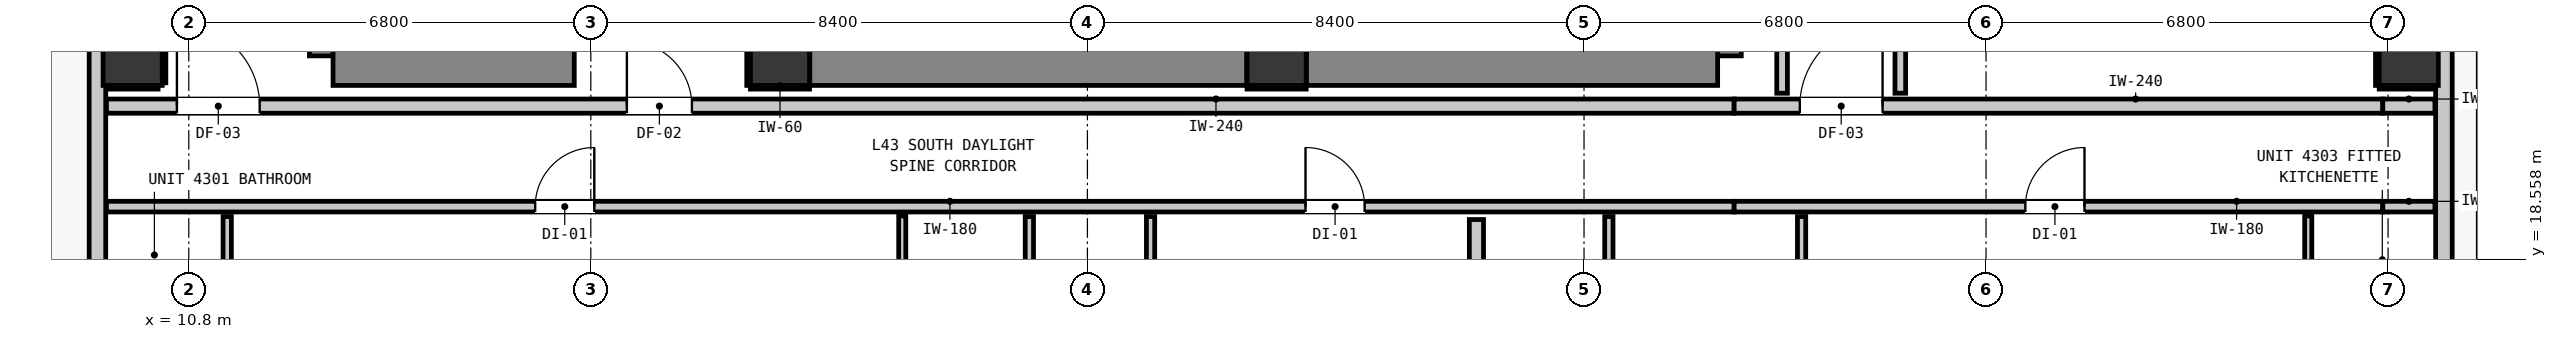
"""IFC4 building model, lengths in metres.
Left out: names, types, materials, properties, quantities, classifications, styles, units other than length and angle.
Written with IfcOpenShell. Run it as: python <this file> out.ifc"""

import sys

from ifc_helpers import new_model, si_unit, direction, frame, frame_2d, origin, origin_2d, place, context, subcontext, project, spatial, rectangle, extrude, element, fill, save


model = new_model("IFC4")
c1 = context("Model", 3, precision=1e-05, world=origin(), true_north=direction((0.0, 1.0)))
c2 = subcontext(c1, "Body", "Model", "MODEL_VIEW")
j1 = project(units=[si_unit("LENGTHUNIT", "METRE"), si_unit("PLANEANGLEUNIT", "RADIAN")], contexts=[c1])
p1 = place(None, origin())
s1 = spatial("IfcSite", under=j1, at=p1, CompositionType="ELEMENT")
p2 = place(p1, origin())
s2 = spatial("IfcBuilding", under=s1, at=p2, CompositionType="ELEMENT")
p3 = place(p2, frame((0.0, 0.0, 149.24)))
s3 = spatial("IfcBuildingStorey", under=s2, at=p3, CompositionType="ELEMENT", Elevation=149.24)
for number, where, z_axis, x_axis in (
    (1, (20.8, 22.0, 0.0), (0.0, 0.0, 1.0), (1.0, 0.0, 0.0)),
    (2, (29.2, 22.0, 0.0), (0.0, 0.0, 1.0), (1.0, 0.0, 0.0)),
):
    element("IfcColumn", number, at=place(p3, frame(where, z_axis=z_axis, x_axis=x_axis)), inside=s3, PredefinedType="COLUMN", context=c2, shape_type="SweptSolid", body=[
        extrude(rectangle(XDim=1.0, YDim=1.0, at=origin_2d()), origin(), (0.0, 0.0, 1.0), 3.32),
    ])
p4 = place(p3, frame((13.34, 22.0, 0.0), z_axis=(0.0, 0.0, 1.0), x_axis=(0.0, 1.0, 0.0)))
e3 = element("IfcWall", 3, at=p4, inside=s3, PredefinedType="SHEAR", context=c2, shape_type="SweptSolid", body=[
    extrude(rectangle(XDim=8.195, YDim=1.0, at=frame_2d((4.098, 0.0))), origin(), (0.0, 0.0, 1.0), 3.32),
])
p5 = place(p3, frame((13.24, 22.0, 0.0), z_axis=(0.0, 0.0, 1.0), x_axis=(1.0, 0.0, 0.0)))
e4 = element("IfcWall", 4, at=p5, inside=s3, PredefinedType="SHEAR", context=c2, shape_type="SweptSolid", body=[
    extrude(rectangle(XDim=4.08, YDim=1.0, at=frame_2d((2.04, 0.0))), origin(), (0.0, 0.0, 1.0), 3.32),
])
p6 = place(p3, frame((36.56, 22.0, 0.0), z_axis=(0.0, 0.0, 1.0), x_axis=(0.0, 1.0, 0.0)))
e5 = element("IfcWall", 5, at=p6, inside=s3, PredefinedType="SHEAR", context=c2, shape_type="SweptSolid", body=[
    extrude(rectangle(XDim=8.195, YDim=1.0, at=frame_2d((4.098, 0.0))), origin(), (0.0, 0.0, 1.0), 3.32),
])
p7 = place(p3, frame((29.705, 22.0, 0.0), z_axis=(0.0, 0.0, 1.0), x_axis=(1.0, 0.0, 0.0)))
e6 = element("IfcWall", 6, at=p7, inside=s3, PredefinedType="SHEAR", context=c2, shape_type="SweptSolid", body=[
    extrude(rectangle(XDim=6.955, YDim=1.0, at=frame_2d((3.478, 0.0))), origin(), (0.0, 0.0, 1.0), 3.32),
])
p8 = place(p3, frame((21.305, 22.0, 0.0), z_axis=(0.0, 0.0, 1.0), x_axis=(1.0, 0.0, 0.0)))
e7 = element("IfcWall", 7, at=p8, inside=s3, PredefinedType="SHEAR", context=c2, shape_type="SweptSolid", body=[
    extrude(rectangle(XDim=7.39, YDim=1.0, at=frame_2d((3.695, 0.0))), origin(), (0.0, 0.0, 1.0), 3.32),
])
for number, where, z_axis, x_axis in (
    (8, (9.85, 22.0, 0.0), (0.0, 0.0, 1.0), (1.0, 0.0, 0.0)),
    (9, (48.35, 22.0, 0.0), (0.0, 0.0, 1.0), (1.0, 0.0, 0.0)),
):
    element("IfcColumn", number, at=place(p3, frame(where, z_axis=z_axis, x_axis=x_axis)), inside=s3, PredefinedType="COLUMN", context=c2, shape_type="SweptSolid", body=[
        extrude(rectangle(XDim=1.0, YDim=1.0, at=origin_2d()), origin(), (0.0, 0.0, 1.0), 3.32),
    ])
p9 = place(p3, frame((9.255, 17.555, 0.0), z_axis=(0.0, 0.0, 1.0), x_axis=(0.0, 1.0, 0.0)))
e10 = element("IfcWall", 10, at=p9, inside=s3, PredefinedType="STANDARD", context=c2, shape_type="SweptSolid", body=[
    extrude(rectangle(XDim=32.29, YDim=0.28, at=frame_2d((16.145, 0.0))), origin(), (0.0, 0.0, 1.0), 3.08),
])
p10 = place(p9, frame((5.467, 0.0, 0.0)))
e11 = element("IfcOpeningElement", 11, at=p10, cuts=e10, PredefinedType="OPENING", context=c2, shape_type="SweptSolid", body=[
    extrude(rectangle(XDim=1.0, YDim=2.15, at=frame_2d((0.5, 1.075))), frame((0.0, 0.15, 0.0), z_axis=(0.0, -1.0, 0.0), x_axis=(1.0, 0.0, 0.0)), (0.0, 0.0, 1.0), 0.3),
])
p11 = place(p9, frame((30.753, 0.0, 0.85)))
e12 = element("IfcOpeningElement", 12, at=p11, cuts=e10, PredefinedType="OPENING", context=c2, shape_type="SweptSolid", body=[
    extrude(rectangle(XDim=1.05, YDim=1.65, at=frame_2d((0.525, 0.825))), frame((0.0, 0.15, 0.0), z_axis=(0.0, -1.0, 0.0), x_axis=(1.0, 0.0, 0.0)), (0.0, 0.0, 1.0), 0.3),
])
p12 = place(p3, frame((48.945, 49.845, 0.0), z_axis=(0.0, 0.0, 1.0), x_axis=(0.0, -1.0, 0.0)))
e13 = element("IfcWall", 13, at=p12, inside=s3, PredefinedType="STANDARD", context=c2, shape_type="SweptSolid", body=[
    extrude(rectangle(XDim=32.29, YDim=0.28, at=frame_2d((16.145, 0.0))), origin(), (0.0, 0.0, 1.0), 3.08),
])
p13 = place(p12, frame((0.904, 0.0, 0.0)))
e14 = element("IfcOpeningElement", 14, at=p13, cuts=e13, PredefinedType="OPENING", context=c2, shape_type="SweptSolid", body=[
    extrude(rectangle(XDim=1.0, YDim=2.15, at=frame_2d((0.5, 1.075))), frame((0.0, 0.15, 0.0), z_axis=(0.0, -1.0, 0.0), x_axis=(1.0, 0.0, 0.0)), (0.0, 0.0, 1.0), 0.3),
])
p14 = place(p12, frame((3.074, 0.0, 0.85)))
e15 = element("IfcOpeningElement", 15, at=p14, cuts=e13, PredefinedType="OPENING", context=c2, shape_type="SweptSolid", body=[
    extrude(rectangle(XDim=1.05, YDim=1.65, at=frame_2d((0.525, 0.825))), frame((0.0, 0.15, 0.0), z_axis=(0.0, -1.0, 0.0), x_axis=(1.0, 0.0, 0.0)), (0.0, 0.0, 1.0), 0.3),
])
p15 = place(p12, frame((23.057, 0.0, 0.85)))
e16 = element("IfcOpeningElement", 16, at=p15, cuts=e13, PredefinedType="OPENING", context=c2, shape_type="SweptSolid", body=[
    extrude(rectangle(XDim=2.7, YDim=2.0, at=frame_2d((1.35, 1.0))), frame((0.0, 0.15, 0.0), z_axis=(0.0, -1.0, 0.0), x_axis=(1.0, 0.0, 0.0)), (0.0, 0.0, 1.0), 0.3),
])
p16 = place(p12, frame((20.733, 0.0, 0.85)))
e17 = element("IfcOpeningElement", 17, at=p16, cuts=e13, PredefinedType="OPENING", context=c2, shape_type="SweptSolid", body=[
    extrude(rectangle(XDim=1.05, YDim=1.65, at=frame_2d((0.525, 0.825))), frame((0.0, 0.15, 0.0), z_axis=(0.0, -1.0, 0.0), x_axis=(1.0, 0.0, 0.0)), (0.0, 0.0, 1.0), 0.3),
])
p17 = place(p12, frame((13.523, 0.0, 0.85)))
e18 = element("IfcOpeningElement", 18, at=p17, cuts=e13, PredefinedType="OPENING", context=c2, shape_type="SweptSolid", body=[
    extrude(rectangle(XDim=2.7, YDim=2.0, at=frame_2d((1.35, 1.0))), frame((0.0, 0.15, 0.0), z_axis=(0.0, -1.0, 0.0), x_axis=(1.0, 0.0, 0.0)), (0.0, 0.0, 1.0), 0.3),
])
p18 = place(p12, frame((11.247, 0.0, 0.85)))
e19 = element("IfcOpeningElement", 19, at=p18, cuts=e13, PredefinedType="OPENING", context=c2, shape_type="SweptSolid", body=[
    extrude(rectangle(XDim=1.05, YDim=1.65, at=frame_2d((0.525, 0.825))), frame((0.0, 0.15, 0.0), z_axis=(0.0, -1.0, 0.0), x_axis=(1.0, 0.0, 0.0)), (0.0, 0.0, 1.0), 0.3),
])
p19 = place(p3, frame((9.407, 21.15, 0.0), z_axis=(0.0, 0.0, 1.0), x_axis=(1.0, 0.0, 0.0)))
e20 = element("IfcWall", 20, at=p19, inside=s3, PredefinedType="PARTITIONING", context=c2, shape_type="SweptSolid", body=[
    extrude(rectangle(XDim=27.532, YDim=0.24, at=frame_2d((13.766, 0.0))), origin(), (0.0, 0.0, 1.0), 3.08),
])
p20 = place(p19, frame((8.803, 0.0, 0.0)))
e21 = element("IfcOpeningElement", 21, at=p20, cuts=e20, PredefinedType="OPENING", context=c2, shape_type="SweptSolid", body=[
    extrude(rectangle(XDim=1.1, YDim=2.15, at=frame_2d((0.55, 1.075))), frame((0.0, 0.13, 0.0), z_axis=(0.0, -1.0, 0.0), x_axis=(1.0, 0.0, 0.0)), (0.0, 0.0, 1.0), 0.26),
])
p21 = place(p19, frame((1.192, 0.0, 0.0)))
e22 = element("IfcOpeningElement", 22, at=p21, cuts=e20, PredefinedType="OPENING", context=c2, shape_type="SweptSolid", body=[
    extrude(rectangle(XDim=1.4, YDim=2.15, at=frame_2d((0.7, 1.075))), frame((0.0, 0.13, 0.0), z_axis=(0.0, -1.0, 0.0), x_axis=(1.0, 0.0, 0.0)), (0.0, 0.0, 1.0), 0.26),
])
p22 = place(p3, frame((36.939, 21.15, 0.0), z_axis=(0.0, 0.0, 1.0), x_axis=(1.0, 0.0, 0.0)))
e23 = element("IfcWall", 23, at=p22, inside=s3, PredefinedType="PARTITIONING", context=c2, shape_type="SweptSolid", body=[
    extrude(rectangle(XDim=10.972, YDim=0.24, at=frame_2d((5.486, 0.0))), origin(), (0.0, 0.0, 1.0), 2.565),
])
p23 = place(p22, frame((1.111, 0.0, 0.0)))
e24 = element("IfcOpeningElement", 24, at=p23, cuts=e23, PredefinedType="OPENING", context=c2, shape_type="SweptSolid", body=[
    extrude(rectangle(XDim=1.4, YDim=2.15, at=frame_2d((0.7, 1.075))), frame((0.0, 0.13, 0.0), z_axis=(0.0, -1.0, 0.0), x_axis=(1.0, 0.0, 0.0)), (0.0, 0.0, 1.0), 0.26),
])
p24 = place(p3, frame((47.911, 21.15, 0.0), z_axis=(0.0, 0.0, 1.0), x_axis=(1.0, 0.0, 0.0)))
e25 = element("IfcWall", 25, at=p24, inside=s3, PredefinedType="PARTITIONING", context=c2, shape_type="SweptSolid", body=[
    extrude(rectangle(XDim=0.882, YDim=0.24, at=frame_2d((0.441, 0.0))), origin(), (0.0, 0.0, 1.0), 3.08),
])
p25 = place(p3, frame((9.407, 19.45, 0.0), z_axis=(0.0, 0.0, 1.0), x_axis=(1.0, 0.0, 0.0)))
e26 = element("IfcWall", 26, at=p25, inside=s3, PredefinedType="PARTITIONING", context=c2, shape_type="SweptSolid", body=[
    extrude(rectangle(XDim=27.532, YDim=0.18, at=frame_2d((13.766, 0.0))), origin(), (0.0, 0.0, 1.0), 3.08),
])
p26 = place(p25, frame((7.252, 0.0, 0.0)))
e27 = element("IfcOpeningElement", 27, at=p26, cuts=e26, PredefinedType="OPENING", context=c2, shape_type="SweptSolid", body=[
    extrude(rectangle(XDim=1.0, YDim=2.15, at=frame_2d((0.5, 1.075))), frame((0.0, 0.1, 0.0), z_axis=(0.0, -1.0, 0.0), x_axis=(1.0, 0.0, 0.0)), (0.0, 0.0, 1.0), 0.2),
])
p27 = place(p25, frame((20.282, 0.0, 0.0)))
e28 = element("IfcOpeningElement", 28, at=p27, cuts=e26, PredefinedType="OPENING", context=c2, shape_type="SweptSolid", body=[
    extrude(rectangle(XDim=1.0, YDim=2.15, at=frame_2d((0.5, 1.075))), frame((0.0, 0.1, 0.0), z_axis=(0.0, -1.0, 0.0), x_axis=(1.0, 0.0, 0.0)), (0.0, 0.0, 1.0), 0.2),
])
p28 = place(p3, frame((36.939, 19.45, 0.0), z_axis=(0.0, 0.0, 1.0), x_axis=(1.0, 0.0, 0.0)))
e29 = element("IfcWall", 29, at=p28, inside=s3, PredefinedType="PARTITIONING", context=c2, shape_type="SweptSolid", body=[
    extrude(rectangle(XDim=10.972, YDim=0.18, at=frame_2d((5.486, 0.0))), origin(), (0.0, 0.0, 1.0), 2.565),
])
p29 = place(p28, frame((4.926, 0.0, 0.0)))
e30 = element("IfcOpeningElement", 30, at=p29, cuts=e29, PredefinedType="OPENING", context=c2, shape_type="SweptSolid", body=[
    extrude(rectangle(XDim=1.0, YDim=2.15, at=frame_2d((0.5, 1.075))), frame((0.0, 0.1, 0.0), z_axis=(0.0, -1.0, 0.0), x_axis=(1.0, 0.0, 0.0)), (0.0, 0.0, 1.0), 0.2),
])
p30 = place(p3, frame((47.911, 19.45, 0.0), z_axis=(0.0, 0.0, 1.0), x_axis=(1.0, 0.0, 0.0)))
e31 = element("IfcWall", 31, at=p30, inside=s3, PredefinedType="PARTITIONING", context=c2, shape_type="SweptSolid", body=[
    extrude(rectangle(XDim=0.882, YDim=0.18, at=frame_2d((0.441, 0.0))), origin(), (0.0, 0.0, 1.0), 3.08),
])
p31 = place(p3, frame((32.58, 15.407, 0.0), z_axis=(0.0, 0.0, 1.0), x_axis=(0.0, 1.0, 0.0)))
e32 = element("IfcWall", 32, at=p31, inside=s3, PredefinedType="PARTITIONING", context=c2, shape_type="SweptSolid", body=[
    extrude(rectangle(XDim=3.825, YDim=0.24, at=frame_2d((1.913, 0.0))), origin(), (0.0, 0.0, 1.0), 3.08),
])
p32 = place(p31, frame((1.568, 0.0, 0.0)))
e33 = element("IfcOpeningElement", 33, at=p32, cuts=e32, PredefinedType="OPENING", context=c2, shape_type="SweptSolid", body=[
    extrude(rectangle(XDim=0.9, YDim=2.1, at=frame_2d((0.45, 1.05))), frame((0.0, 0.13, 0.0), z_axis=(0.0, -1.0, 0.0), x_axis=(1.0, 0.0, 0.0)), (0.0, 0.0, 1.0), 0.26),
])
p33 = place(p3, frame((37.75, 21.368, 0.0), z_axis=(0.0, 0.0, 1.0), x_axis=(0.0, 1.0, 0.0)))
e34 = element("IfcWall", 34, at=p33, inside=s3, PredefinedType="PARTITIONING", context=c2, shape_type="SweptSolid", body=[
    extrude(rectangle(XDim=18.694, YDim=0.18, at=frame_2d((9.347, 0.0))), origin(), (0.0, 0.0, 1.0), 3.08),
])
p34 = place(p3, frame((39.75, 21.368, 0.0), z_axis=(0.0, 0.0, 1.0), x_axis=(0.0, 1.0, 0.0)))
e35 = element("IfcWall", 35, at=p34, inside=s3, PredefinedType="PARTITIONING", context=c2, shape_type="SweptSolid", body=[
    extrude(rectangle(XDim=2.074, YDim=0.18, at=frame_2d((1.037, 0.0))), origin(), (0.0, 0.0, 1.0), 3.08),
])
p35 = place(p3, frame((11.45, 16.278, 0.0), z_axis=(0.0, 0.0, 1.0), x_axis=(0.0, 1.0, 0.0)))
e36 = element("IfcWall", 36, at=p35, inside=s3, PredefinedType="PARTITIONING", context=c2, shape_type="SweptSolid", body=[
    extrude(rectangle(XDim=3.004, YDim=0.14, at=frame_2d((1.502, 0.0))), origin(), (0.0, 0.0, 1.0), 2.565),
])
p36 = place(p35, frame((0.717, 0.0, 0.0)))
e37 = element("IfcOpeningElement", 37, at=p36, cuts=e36, PredefinedType="OPENING", context=c2, shape_type="SweptSolid", body=[
    extrude(rectangle(XDim=0.86, YDim=2.02, at=frame_2d((0.43, 1.01))), frame((0.0, 0.08, 0.0), z_axis=(0.0, -1.0, 0.0), x_axis=(1.0, 0.0, 0.0)), (0.0, 0.0, 1.0), 0.16),
])
p37 = place(p3, frame((25.018, 15.407, 0.0), z_axis=(0.0, 0.0, 1.0), x_axis=(0.0, 1.0, 0.0)))
e38 = element("IfcWall", 38, at=p37, inside=s3, PredefinedType="PARTITIONING", context=c2, shape_type="SweptSolid", body=[
    extrude(rectangle(XDim=3.875, YDim=0.14, at=frame_2d((1.938, 0.0))), origin(), (0.0, 0.0, 1.0), 3.08),
])
p38 = place(p3, frame((27.068, 15.407, 0.0), z_axis=(0.0, 0.0, 1.0), x_axis=(0.0, 1.0, 0.0)))
e39 = element("IfcWall", 39, at=p38, inside=s3, PredefinedType="PARTITIONING", context=c2, shape_type="SweptSolid", body=[
    extrude(rectangle(XDim=3.875, YDim=0.14, at=frame_2d((1.938, 0.0))), origin(), (0.0, 0.0, 1.0), 3.08),
])
p39 = place(p38, frame((1.588, 0.0, 0.0)))
e40 = element("IfcOpeningElement", 40, at=p39, cuts=e39, PredefinedType="OPENING", context=c2, shape_type="SweptSolid", body=[
    extrude(rectangle(XDim=0.86, YDim=2.02, at=frame_2d((0.43, 1.01))), frame((0.0, 0.08, 0.0), z_axis=(0.0, -1.0, 0.0), x_axis=(1.0, 0.0, 0.0)), (0.0, 0.0, 1.0), 0.16),
])
p40 = place(p3, frame((34.82, 15.407, 0.0), z_axis=(0.0, 0.0, 1.0), x_axis=(0.0, 1.0, 0.0)))
e41 = element("IfcWall", 41, at=p40, inside=s3, PredefinedType="PARTITIONING", context=c2, shape_type="SweptSolid", body=[
    extrude(rectangle(XDim=3.875, YDim=0.14, at=frame_2d((1.938, 0.0))), origin(), (0.0, 0.0, 1.0), 3.08),
])
p41 = place(p3, frame((38.08, 15.407, 0.0), z_axis=(0.0, 0.0, 1.0), x_axis=(0.0, 1.0, 0.0)))
e42 = element("IfcWall", 42, at=p41, inside=s3, PredefinedType="PARTITIONING", context=c2, shape_type="SweptSolid", body=[
    extrude(rectangle(XDim=3.875, YDim=0.14, at=frame_2d((1.938, 0.0))), origin(), (0.0, 0.0, 1.0), 3.08),
])
p42 = place(p41, frame((1.588, 0.0, 0.0)))
e43 = element("IfcOpeningElement", 43, at=p42, cuts=e42, PredefinedType="OPENING", context=c2, shape_type="SweptSolid", body=[
    extrude(rectangle(XDim=0.86, YDim=2.02, at=frame_2d((0.43, 1.01))), frame((0.0, 0.08, 0.0), z_axis=(0.0, -1.0, 0.0), x_axis=(1.0, 0.0, 0.0)), (0.0, 0.0, 1.0), 0.16),
])
p43 = place(p3, frame((22.868, 15.407, 0.0), z_axis=(0.0, 0.0, 1.0), x_axis=(0.0, 1.0, 0.0)))
e44 = element("IfcWall", 44, at=p43, inside=s3, PredefinedType="PARTITIONING", context=c2, shape_type="SweptSolid", body=[
    extrude(rectangle(XDim=3.885, YDim=0.12, at=frame_2d((1.942, 0.0))), origin(), (0.0, 0.0, 1.0), 3.08),
])
p44 = place(p43, frame((1.568, 0.0, 0.0)))
e45 = element("IfcOpeningElement", 45, at=p44, cuts=e44, PredefinedType="OPENING", context=c2, shape_type="SweptSolid", body=[
    extrude(rectangle(XDim=0.9, YDim=2.1, at=frame_2d((0.45, 1.05))), frame((0.0, 0.07, 0.0), z_axis=(0.0, -1.0, 0.0), x_axis=(1.0, 0.0, 0.0)), (0.0, 0.0, 1.0), 0.14),
])
p45 = place(p3, frame((46.65, 15.475, 0.0), z_axis=(0.0, 0.0, 1.0), x_axis=(0.0, 1.0, 0.0)))
e46 = element("IfcWall", 46, at=p45, inside=s3, PredefinedType="PARTITIONING", context=c2, shape_type="SweptSolid", body=[
    extrude(rectangle(XDim=3.817, YDim=0.12, at=frame_2d((1.908, 0.0))), origin(), (0.0, 0.0, 1.0), 3.08),
])
p46 = place(p45, frame((1.5, 0.0, 0.0)))
e47 = element("IfcOpeningElement", 47, at=p46, cuts=e46, PredefinedType="OPENING", context=c2, shape_type="SweptSolid", body=[
    extrude(rectangle(XDim=0.9, YDim=2.1, at=frame_2d((0.45, 1.05))), frame((0.0, 0.07, 0.0), z_axis=(0.0, -1.0, 0.0), x_axis=(1.0, 0.0, 0.0)), (0.0, 0.0, 1.0), 0.14),
])
for number, where, z_axis, x_axis in (
    (48, (20.3, 21.468, 0.0), (0.0, 0.0, 1.0), (1.0, 0.0, 0.0)),
    (49, (20.268, 21.5, 0.0), (0.0, 0.0, 1.0), (0.0, 1.0, 0.0)),
    (50, (28.7, 21.468, 0.0), (0.0, 0.0, 1.0), (1.0, 0.0, 0.0)),
):
    element("IfcWall", number, at=place(p3, frame(where, z_axis=z_axis, x_axis=x_axis)), inside=s3, PredefinedType="PARTITIONING", context=c2, shape_type="SweptSolid", body=[
        extrude(rectangle(XDim=1.0, YDim=0.06, at=frame_2d((0.5, 0.0))), origin(), (0.0, 0.0, 1.0), 1.45),
    ])
p47 = place(p3, frame((9.41, 21.468, 0.0), z_axis=(0.0, 0.0, 1.0), x_axis=(1.0, 0.0, 0.0)))
e51 = element("IfcWall", 51, at=p47, inside=s3, PredefinedType="PARTITIONING", context=c2, shape_type="SweptSolid", body=[
    extrude(rectangle(XDim=0.871, YDim=0.06, at=frame_2d((0.436, 0.0))), origin(), (0.0, 0.0, 1.0), 1.45),
])
p48 = place(p3, frame((10.382, 21.544, 0.0), z_axis=(0.0, 0.0, 1.0), x_axis=(0.0, 1.0, 0.0)))
e52 = element("IfcWall", 52, at=p48, inside=s3, PredefinedType="PARTITIONING", context=c2, shape_type="SweptSolid", body=[
    extrude(rectangle(XDim=0.956, YDim=0.06, at=frame_2d((0.478, 0.0))), origin(), (0.0, 0.0, 1.0), 1.45),
])
p49 = place(p3, frame((47.85, 21.468, 0.0), z_axis=(0.0, 0.0, 1.0), x_axis=(1.0, 0.0, 0.0)))
e53 = element("IfcWall", 53, at=p49, inside=s3, PredefinedType="PARTITIONING", context=c2, shape_type="SweptSolid", body=[
    extrude(rectangle(XDim=0.94, YDim=0.06, at=frame_2d((0.47, 0.0))), origin(), (0.0, 0.0, 1.0), 1.45),
])
p50 = place(p3, frame((47.818, 21.5, 0.0), z_axis=(0.0, 0.0, 1.0), x_axis=(0.0, 1.0, 0.0)))
e54 = element("IfcWall", 54, at=p50, inside=s3, PredefinedType="PARTITIONING", context=c2, shape_type="SweptSolid", body=[
    extrude(rectangle(XDim=1.0, YDim=0.06, at=frame_2d((0.5, 0.0))), origin(), (0.0, 0.0, 1.0), 1.45),
])
p51 = place(p20, origin())
e55 = element("IfcDoor", 55, at=p51, inside=s3, OperationType="SINGLE_SWING_LEFT", PredefinedType="DOOR", context=c2, shape_type="SweptSolid", body=[
    extrude(rectangle(XDim=1.1, YDim=2.15, at=frame_2d((0.55, 1.075))), frame((0.0, 0.025, 0.0), z_axis=(0.0, -1.0, 0.0), x_axis=(1.0, 0.0, 0.0)), (0.0, 0.0, 1.0), 0.05),
])
fill(e21, e55)
p52 = place(p21, origin())
e56 = element("IfcDoor", 56, at=p52, inside=s3, OperationType="SINGLE_SWING_LEFT", PredefinedType="DOOR", context=c2, shape_type="SweptSolid", body=[
    extrude(rectangle(XDim=1.4, YDim=2.15, at=frame_2d((0.7, 1.075))), frame((0.0, 0.025, 0.0), z_axis=(0.0, -1.0, 0.0), x_axis=(1.0, 0.0, 0.0)), (0.0, 0.0, 1.0), 0.05),
])
fill(e22, e56)
p53 = place(p23, origin())
e57 = element("IfcDoor", 57, at=p53, inside=s3, OperationType="SINGLE_SWING_RIGHT", PredefinedType="DOOR", context=c2, shape_type="SweptSolid", body=[
    extrude(rectangle(XDim=1.4, YDim=2.15, at=frame_2d((0.7, 1.075))), frame((0.0, 0.025, 0.0), z_axis=(0.0, -1.0, 0.0), x_axis=(1.0, 0.0, 0.0)), (0.0, 0.0, 1.0), 0.05),
])
fill(e24, e57)
p54 = place(p26, origin())
e58 = element("IfcDoor", 58, at=p54, inside=s3, OperationType="SINGLE_SWING_RIGHT", PredefinedType="DOOR", context=c2, shape_type="SweptSolid", body=[
    extrude(rectangle(XDim=1.0, YDim=2.15, at=frame_2d((0.5, 1.075))), frame((0.0, 0.025, 0.0), z_axis=(0.0, -1.0, 0.0), x_axis=(1.0, 0.0, 0.0)), (0.0, 0.0, 1.0), 0.05),
])
fill(e27, e58)
p55 = place(p27, origin())
e59 = element("IfcDoor", 59, at=p55, inside=s3, OperationType="SINGLE_SWING_LEFT", PredefinedType="DOOR", context=c2, shape_type="SweptSolid", body=[
    extrude(rectangle(XDim=1.0, YDim=2.15, at=frame_2d((0.5, 1.075))), frame((0.0, 0.025, 0.0), z_axis=(0.0, -1.0, 0.0), x_axis=(1.0, 0.0, 0.0)), (0.0, 0.0, 1.0), 0.05),
])
fill(e28, e59)
p56 = place(p29, origin())
e60 = element("IfcDoor", 60, at=p56, inside=s3, OperationType="SINGLE_SWING_RIGHT", PredefinedType="DOOR", context=c2, shape_type="SweptSolid", body=[
    extrude(rectangle(XDim=1.0, YDim=2.15, at=frame_2d((0.5, 1.075))), frame((0.0, 0.025, 0.0), z_axis=(0.0, -1.0, 0.0), x_axis=(1.0, 0.0, 0.0)), (0.0, 0.0, 1.0), 0.05),
])
fill(e30, e60)
save(model, sys.argv[1])
